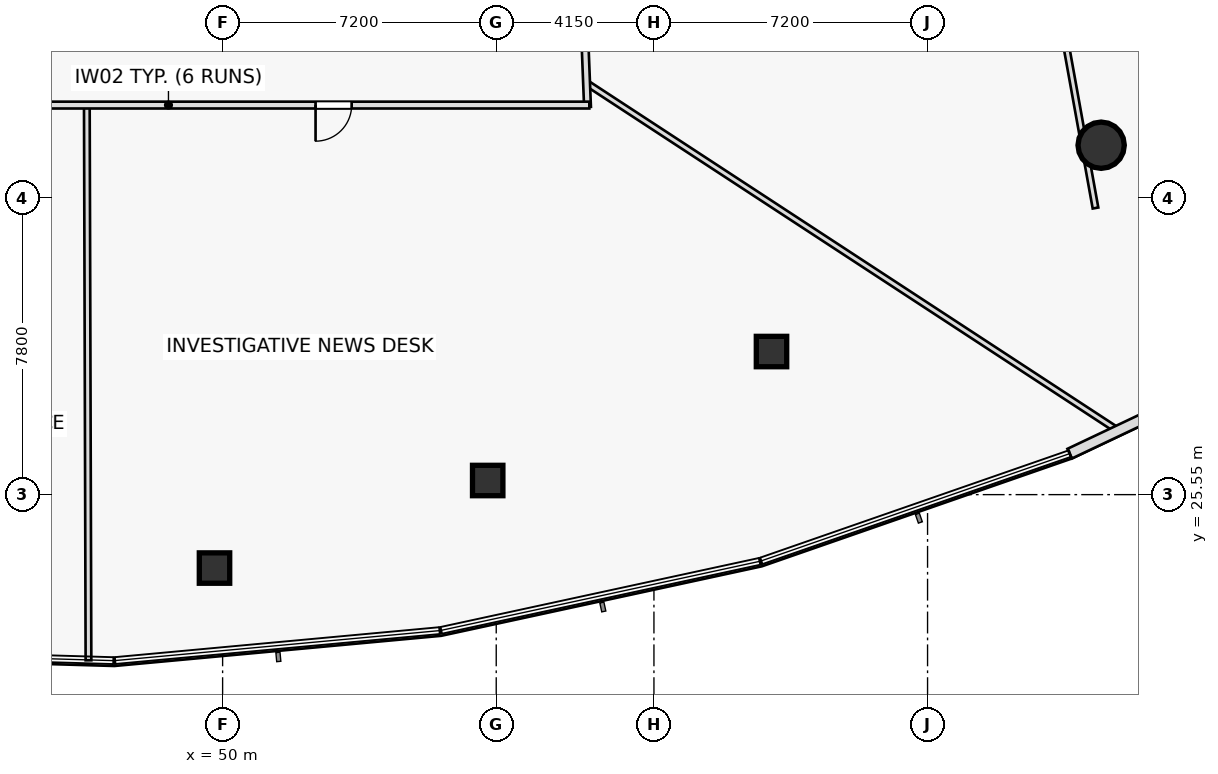
"""IFC4 building model, lengths in metres.
Left out: names, types, materials, properties, quantities, classifications, styles, units other than length and angle.
Written with IfcOpenShell. Run it as: python <this file> out.ifc"""

import sys

from ifc_helpers import new_model, si_unit, direction, frame, frame_2d, origin, origin_2d, place, context, subcontext, project, spatial, rectangle, hollow_rectangle, hollow_circle, extrude, element, fill, save


model = new_model("IFC4")
c1 = context("Model", 3, precision=1e-05, world=origin(), true_north=direction((0.0, 1.0)))
c2 = subcontext(c1, "Body", "Model", "MODEL_VIEW")
j1 = project(units=[si_unit("LENGTHUNIT", "METRE"), si_unit("PLANEANGLEUNIT", "RADIAN")], contexts=[c1])
p1 = place(None, origin())
s1 = spatial("IfcSite", under=j1, at=p1, CompositionType="ELEMENT")
p2 = place(p1, origin())
s2 = spatial("IfcBuilding", under=s1, at=p2, CompositionType="ELEMENT")
p3 = place(p2, frame((0.0, 0.0, 31.5)))
s3 = spatial("IfcBuildingStorey", under=s2, at=p3, CompositionType="ELEMENT", Elevation=31.5)
for number, where, z_axis, x_axis in (
    (1, (49.787, 23.618, 0.0), (0.0, 0.0, 1.0), (1.0, 0.0, 0.0)),
    (2, (56.975, 25.921, 0.0), (0.0, 0.0, 1.0), (1.0, 0.0, 0.0)),
    (3, (64.444, 29.315, 0.0), (0.0, 0.0, 1.0), (1.0, 0.0, 0.0)),
):
    element("IfcColumn", number, at=place(p3, frame(where, z_axis=z_axis, x_axis=x_axis)), inside=s3, PredefinedType="COLUMN", context=c2, shape_type="SweptSolid", body=[
        extrude(hollow_rectangle(XDim=0.8, YDim=0.8, WallThickness=0.045, at=origin_2d()), origin(), (0.0, 0.0, 1.0), 3.6),
    ])
p4 = place(p3, frame((73.118, 34.744, 0.0), z_axis=(0.0, 0.0, 1.0), x_axis=(1.0, 0.0, 0.0)))
e4 = element("IfcColumn", 4, at=p4, inside=s3, PredefinedType="COLUMN", context=c2, shape_type="SweptSolid", body=[
    extrude(hollow_circle(Radius=0.61, WallThickness=0.05, at=origin_2d()), origin(), (0.0, 0.0, 1.0), 3.6),
])
p5 = place(p3, frame((72.969, 33.091, 0.0), z_axis=(0.0, 0.0, 1.0), x_axis=(-0.177742578179, 0.984077017261, 0.0)))
e5 = element("IfcWall", 5, at=p5, inside=s3, PredefinedType="PARTITIONING", context=c2, shape_type="SweptSolid", body=[
    extrude(rectangle(XDim=13.179, YDim=0.15, at=frame_2d((6.59, 0.0))), origin(), (0.0, 0.0, 1.0), 2.925),
])
p6 = place(p3, frame((46.427, 35.8, 0.0), z_axis=(0.0, 0.0, 1.0), x_axis=(0.002958023057, -0.99999562504, 0.0)))
e6 = element("IfcWall", 6, at=p6, inside=s3, PredefinedType="PARTITIONING", context=c2, shape_type="SweptSolid", body=[
    extrude(rectangle(XDim=14.609, YDim=0.15, at=frame_2d((7.304, 0.0))), origin(), (0.0, 0.0, 1.0), 2.925),
])
p7 = place(p3, frame((59.577, 36.381, 0.0), z_axis=(0.0, 0.0, 1.0), x_axis=(0.83686493474, -0.547409427214, 0.0)))
e7 = element("IfcWall", 7, at=p7, inside=s3, PredefinedType="PARTITIONING", context=c2, shape_type="SweptSolid", body=[
    extrude(rectangle(XDim=16.725, YDim=0.15, at=frame_2d((8.362, 0.0))), origin(), (0.0, 0.0, 1.0), 2.975),
])
p8 = place(p3, frame((59.392, 41.1, 0.0), z_axis=(0.0, 0.0, 1.0), x_axis=(0.03921413315, -0.999230830069, 0.0)))
e8 = element("IfcWall", 8, at=p8, inside=s3, PredefinedType="PARTITIONING", context=c2, shape_type="SweptSolid", body=[
    extrude(rectangle(XDim=5.354, YDim=0.18, at=frame_2d((2.677, 0.0))), origin(), (0.0, 0.0, 1.0), 2.925),
])
p9 = place(p8, frame((2.037, 0.0, 0.0)))
e9 = element("IfcOpeningElement", 9, at=p9, cuts=e8, PredefinedType="OPENING", context=c2, shape_type="SweptSolid", body=[
    extrude(rectangle(XDim=0.95, YDim=2.05, at=frame_2d((0.475, 1.025))), frame((0.0, 0.1, 0.0), z_axis=(0.0, -1.0, 0.0), x_axis=(1.0, 0.0, 0.0)), (0.0, 0.0, 1.0), 0.2),
])
p10 = place(p3, frame((59.65, 35.8, 0.0), z_axis=(0.0, 0.0, 1.0), x_axis=(-1.0, 0.0, 0.0)))
e10 = element("IfcWall", 10, at=p10, inside=s3, PredefinedType="PARTITIONING", context=c2, shape_type="SweptSolid", body=[
    extrude(rectangle(XDim=22.15, YDim=0.18, at=frame_2d((11.075, 0.0))), origin(), (0.0, 0.0, 1.0), 2.925),
])
p11 = place(p10, frame((6.254, 0.0, 0.0)))
e11 = element("IfcOpeningElement", 11, at=p11, cuts=e10, PredefinedType="OPENING", context=c2, shape_type="SweptSolid", body=[
    extrude(rectangle(XDim=0.95, YDim=2.05, at=frame_2d((0.475, 1.025))), frame((0.0, 0.1, 0.0), z_axis=(0.0, -1.0, 0.0), x_axis=(1.0, 0.0, 0.0)), (0.0, 0.0, 1.0), 0.2),
])
p12 = place(p10, frame((15.103, 0.0, 0.0)))
e12 = element("IfcOpeningElement", 12, at=p12, cuts=e10, PredefinedType="OPENING", context=c2, shape_type="SweptSolid", body=[
    extrude(rectangle(XDim=0.95, YDim=2.05, at=frame_2d((0.475, 1.025))), frame((0.0, 0.1, 0.0), z_axis=(0.0, -1.0, 0.0), x_axis=(1.0, 0.0, 0.0)), (0.0, 0.0, 1.0), 0.2),
])
p13 = place(p3, frame((72.29, 26.628, 0.0), z_axis=(0.0, 0.0, 1.0), x_axis=(0.903751094917, 0.42805835868, 0.0)))
e13 = element("IfcWall", 13, at=p13, inside=s3, PredefinedType="STANDARD", context=c2, shape_type="SweptSolid", body=[
    extrude(rectangle(XDim=2.25, YDim=0.28, at=frame_2d((1.125, 0.0))), origin(), (0.0, 0.0, 1.0), 3.6),
])
p14 = place(p3, frame((76.034, 33.584, 0.0), z_axis=(0.0, 0.0, 1.0), x_axis=(-0.249078863516, 0.968483205714, 0.0)))
e14 = element("IfcWall", 14, at=p14, inside=s3, PredefinedType="STANDARD", context=c2, shape_type="SweptSolid", body=[
    extrude(rectangle(XDim=8.649, YDim=0.28, at=frame_2d((4.325, 0.0))), origin(), (0.0, 0.0, 1.0), 3.6),
])
p15 = place(p11, origin())
e15 = element("IfcDoor", 15, at=p15, inside=s3, OperationType="SINGLE_SWING_RIGHT", PredefinedType="DOOR", context=c2, shape_type="SweptSolid", body=[
    extrude(rectangle(XDim=0.95, YDim=2.05, at=frame_2d((0.475, 1.025))), frame((0.0, 0.025, 0.0), z_axis=(0.0, -1.0, 0.0), x_axis=(1.0, 0.0, 0.0)), (0.0, 0.0, 1.0), 0.05),
])
fill(e11, e15)
save(model, sys.argv[1])
